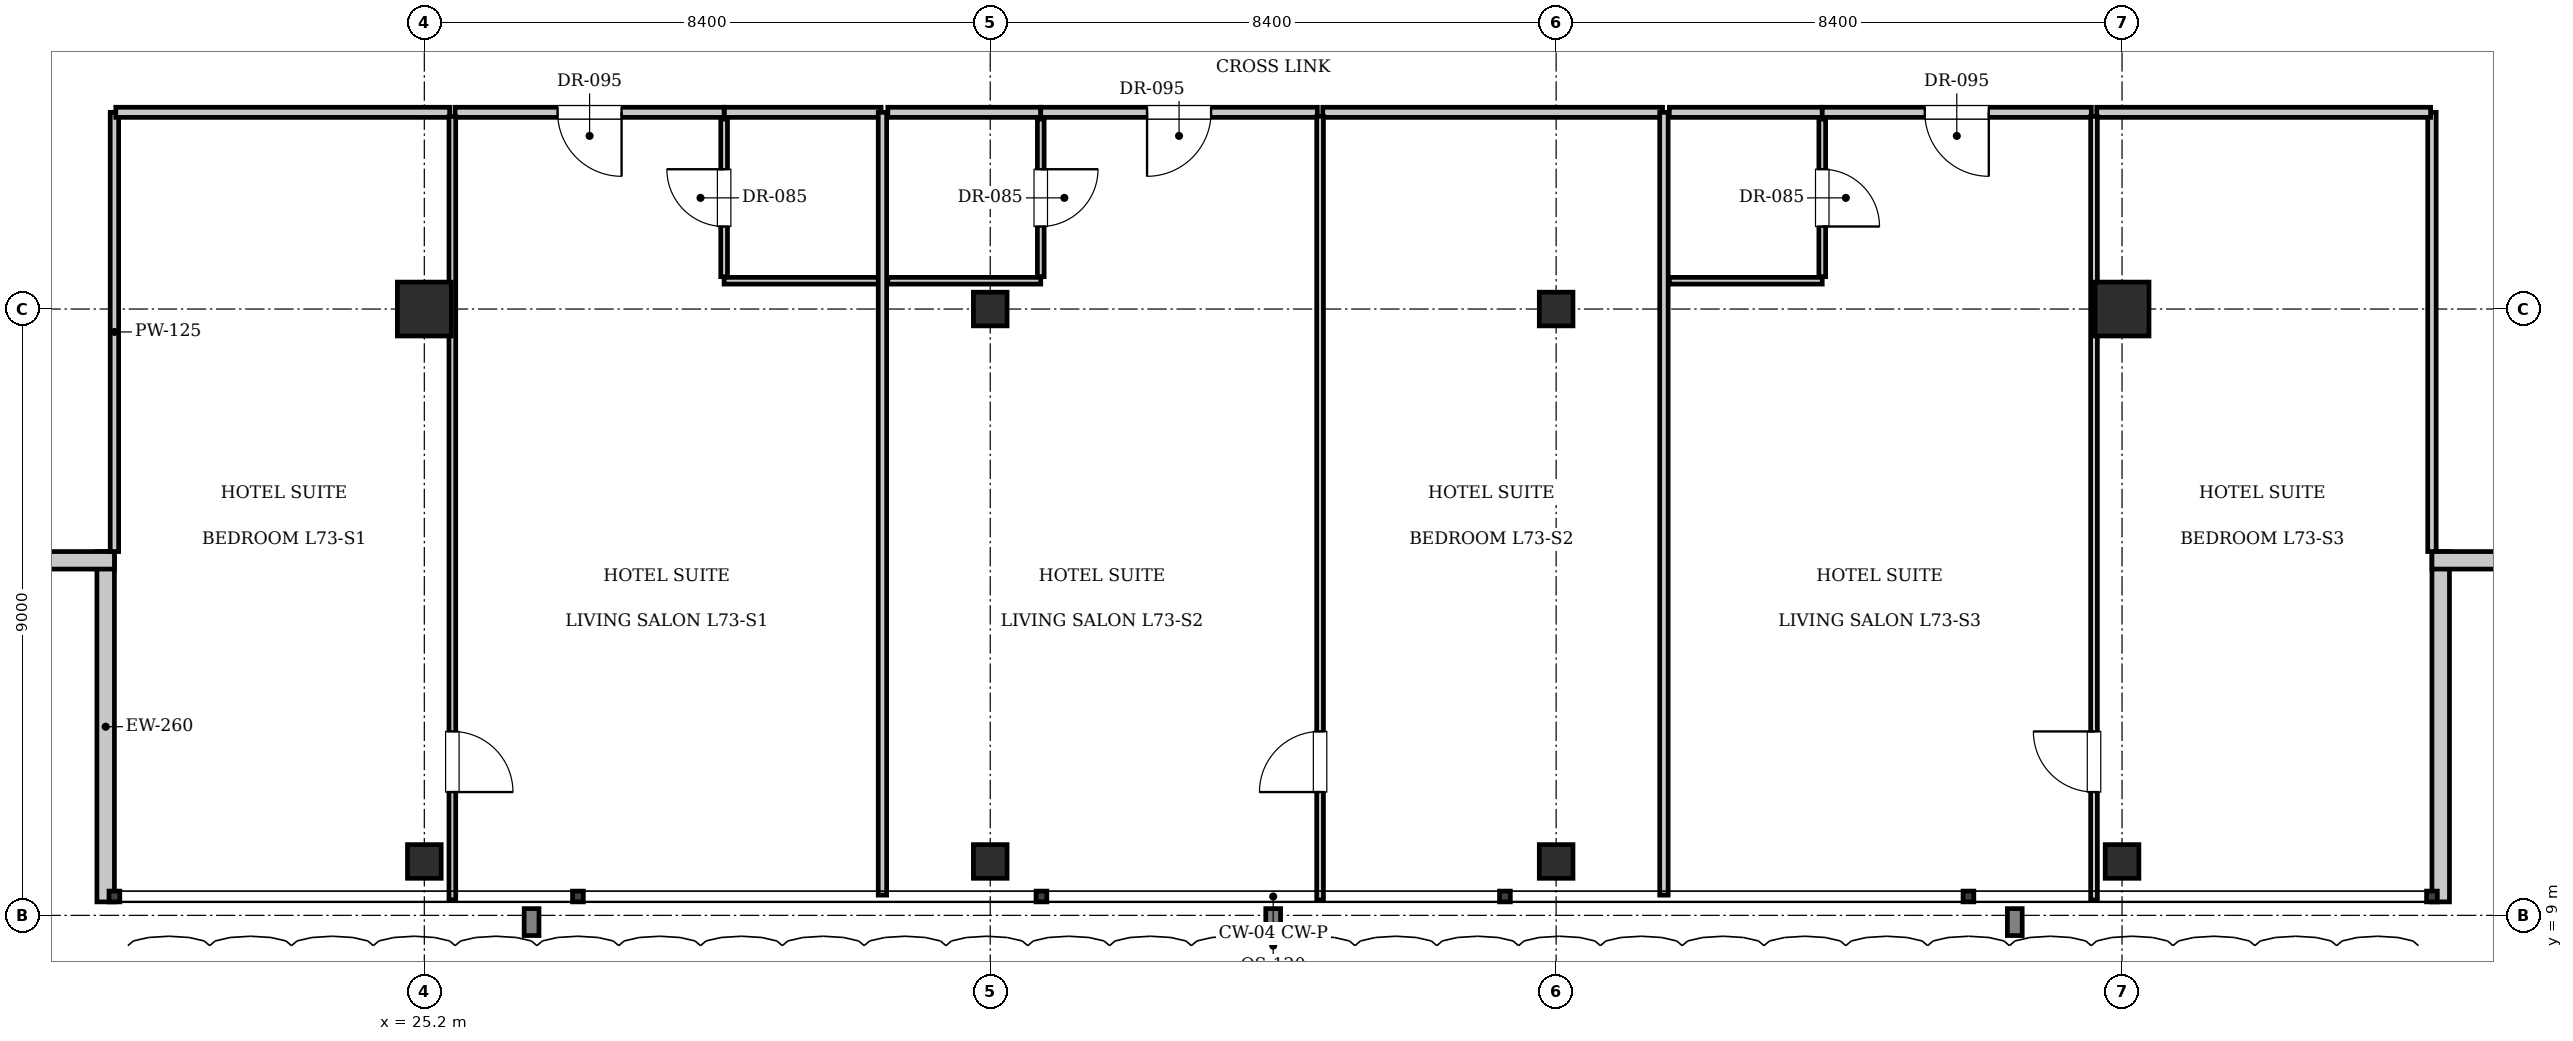
"""IFC4 building model, lengths in metres.
Left out: names, types, materials, properties, quantities, classifications, styles, units other than length and angle.
Written with IfcOpenShell. Run it as: python <this file> out.ifc"""

import sys

from ifc_helpers import new_model, si_unit, direction, frame, frame_2d, origin, origin_2d, place, context, subcontext, project, spatial, rectangle, i_section, extrude, element, fill, save


model = new_model("IFC4")
c1 = context("Model", 3, precision=1e-05, world=origin(), true_north=direction((0.0, 1.0)))
c2 = subcontext(c1, "Body", "Model", "MODEL_VIEW")
j1 = project(units=[si_unit("LENGTHUNIT", "METRE"), si_unit("PLANEANGLEUNIT", "RADIAN")], contexts=[c1])
p1 = place(None, origin())
s1 = spatial("IfcSite", under=j1, at=p1, CompositionType="ELEMENT")
p2 = place(p1, origin())
s2 = spatial("IfcBuilding", under=s1, at=p2, CompositionType="ELEMENT")
p3 = place(p2, frame((0.0, 0.0, 297.15)))
s3 = spatial("IfcBuildingStorey", under=s2, at=p3, CompositionType="ELEMENT", Elevation=297.15)
for number, where, z_axis, x_axis in (
    (1, (25.2, 18.0, 0.0), (0.0, 0.0, 1.0), (1.0, 0.0, 0.0)),
    (2, (50.4, 18.0, 0.0), (0.0, 0.0, 1.0), (1.0, 0.0, 0.0)),
):
    element("IfcColumn", number, at=place(p3, frame(where, z_axis=z_axis, x_axis=x_axis)), inside=s3, PredefinedType="COLUMN", context=c2, shape_type="SweptSolid", body=[
        extrude(rectangle(XDim=0.8, YDim=0.8, at=origin_2d()), origin(), (0.0, 0.0, 1.0), 3.85),
    ])
for number, where, z_axis, x_axis in (
    (3, (33.6, 18.0, 0.0), (0.0, 0.0, 1.0), (1.0, 0.0, 0.0)),
    (4, (42.0, 18.0, 0.0), (0.0, 0.0, 1.0), (1.0, 0.0, 0.0)),
    (5, (25.2, 9.8, 0.0), (0.0, 0.0, 1.0), (1.0, 0.0, 0.0)),
    (6, (33.6, 9.8, 0.0), (0.0, 0.0, 1.0), (1.0, 0.0, 0.0)),
    (7, (42.0, 9.8, 0.0), (0.0, 0.0, 1.0), (1.0, 0.0, 0.0)),
    (8, (50.4, 9.8, 0.0), (0.0, 0.0, 1.0), (1.0, 0.0, 0.0)),
):
    element("IfcColumn", number, at=place(p3, frame(where, z_axis=z_axis, x_axis=x_axis)), inside=s3, PredefinedType="COLUMN", context=c2, shape_type="SweptSolid", body=[
        extrude(i_section(OverallWidth=0.5, OverallDepth=0.5, WebThickness=0.022, FlangeThickness=0.032, at=origin_2d()), origin(), (0.0, 0.0, 1.0), 3.85),
    ])
p4 = place(p3, frame((20.47, 9.2, 0.0), z_axis=(0.0, 0.0, 1.0), x_axis=(0.0, 1.0, 0.0)))
e9 = element("IfcWall", 9, at=p4, inside=s3, PredefinedType="SOLIDWALL", context=c2, shape_type="SweptSolid", body=[
    extrude(rectangle(XDim=5.2, YDim=0.26, at=frame_2d((2.6, 0.0))), origin(), (0.0, 0.0, 1.0), 3.61),
])
p5 = place(p3, frame((20.6, 14.27, 0.0), z_axis=(0.0, 0.0, 1.0), x_axis=(-1.0, 0.0, 0.0)))
e10 = element("IfcWall", 10, at=p5, inside=s3, PredefinedType="SOLIDWALL", context=c2, shape_type="SweptSolid", body=[
    extrude(rectangle(XDim=5.2, YDim=0.26, at=frame_2d((2.6, 0.0))), origin(), (0.0, 0.0, 1.0), 3.61),
])
p6 = place(p5, frame((1.6, 0.0, 0.9)))
e11 = element("IfcOpeningElement", 11, at=p6, cuts=e10, PredefinedType="OPENING", context=c2, shape_type="SweptSolid", body=[
    extrude(rectangle(XDim=2.0, YDim=2.2, at=frame_2d((1.0, 1.1))), frame((0.0, 0.14, 0.0), z_axis=(0.0, -1.0, 0.0), x_axis=(1.0, 0.0, 0.0)), (0.0, 0.0, 1.0), 0.28),
])
p7 = place(p3, frame((55.13, 14.4, 0.0), z_axis=(0.0, 0.0, 1.0), x_axis=(0.0, -1.0, 0.0)))
e12 = element("IfcWall", 12, at=p7, inside=s3, PredefinedType="SOLIDWALL", context=c2, shape_type="SweptSolid", body=[
    extrude(rectangle(XDim=5.2, YDim=0.26, at=frame_2d((2.6, 0.0))), origin(), (0.0, 0.0, 1.0), 3.61),
])
p8 = place(p3, frame((60.2, 14.27, 0.0), z_axis=(0.0, 0.0, 1.0), x_axis=(-1.0, 0.0, 0.0)))
e13 = element("IfcWall", 13, at=p8, inside=s3, PredefinedType="SOLIDWALL", context=c2, shape_type="SweptSolid", body=[
    extrude(rectangle(XDim=5.2, YDim=0.26, at=frame_2d((2.6, 0.0))), origin(), (0.0, 0.0, 1.0), 3.61),
])
p9 = place(p8, frame((1.6, 0.0, 0.9)))
e14 = element("IfcOpeningElement", 14, at=p9, cuts=e13, PredefinedType="OPENING", context=c2, shape_type="SweptSolid", body=[
    extrude(rectangle(XDim=2.0, YDim=2.2, at=frame_2d((1.0, 1.1))), frame((0.0, 0.14, 0.0), z_axis=(0.0, -1.0, 0.0), x_axis=(1.0, 0.0, 0.0)), (0.0, 0.0, 1.0), 0.28),
])
for number, where, z_axis, x_axis in (
    (15, (20.6, 14.4, 0.0), (0.0, 0.0, 1.0), (0.0, 1.0, 0.0)),
    (16, (55.0, 14.4, 0.0), (0.0, 0.0, 1.0), (0.0, 1.0, 0.0)),
):
    element("IfcWall", number, at=place(p3, frame(where, z_axis=z_axis, x_axis=x_axis)), inside=s3, PredefinedType="PARTITIONING", context=c2, shape_type="SweptSolid", body=[
        extrude(rectangle(XDim=6.52, YDim=0.125, at=frame_2d((3.26, 0.0))), origin(), (0.0, 0.0, 1.0), 3.61),
    ])
p10 = place(p3, frame((29.65, 20.92, 0.0), z_axis=(0.0, 0.0, 1.0), x_axis=(1.0, 0.0, 0.0)))
e17 = element("IfcWall", 17, at=p10, inside=s3, PredefinedType="PARTITIONING", context=c2, shape_type="SweptSolid", body=[
    extrude(rectangle(XDim=2.33, YDim=0.15, at=frame_2d((1.165, 0.0))), origin(), (0.0, 0.0, 1.0), 3.61),
])
p11 = place(p3, frame((29.65, 18.42, 0.0), z_axis=(0.0, 0.0, 1.0), x_axis=(1.0, 0.0, 0.0)))
e18 = element("IfcWall", 18, at=p11, inside=s3, PredefinedType="PARTITIONING", context=c2, shape_type="SweptSolid", body=[
    extrude(rectangle(XDim=2.31, YDim=0.1, at=frame_2d((1.155, 0.0))), origin(), (0.0, 0.0, 1.0), 3.61),
])
p12 = place(p3, frame((29.65, 18.48, 0.0), z_axis=(0.0, 0.0, 1.0), x_axis=(0.0, 1.0, 0.0)))
e19 = element("IfcWall", 19, at=p12, inside=s3, PredefinedType="PARTITIONING", context=c2, shape_type="SweptSolid", body=[
    extrude(rectangle(XDim=2.34, YDim=0.1, at=frame_2d((1.17, 0.0))), origin(), (0.0, 0.0, 1.0), 3.61),
])
p13 = place(p12, frame((0.745, 0.0, 0.0)))
e20 = element("IfcOpeningElement", 20, at=p13, cuts=e19, PredefinedType="OPENING", context=c2, shape_type="SweptSolid", body=[
    extrude(rectangle(XDim=0.85, YDim=2.1, at=frame_2d((0.425, 1.05))), frame((0.0, 0.06, 0.0), z_axis=(0.0, -1.0, 0.0), x_axis=(1.0, 0.0, 0.0)), (0.0, 0.0, 1.0), 0.12),
])
p14 = place(p3, frame((20.62, 20.92, 0.0), z_axis=(0.0, 0.0, 1.0), x_axis=(1.0, 0.0, 0.0)))
e21 = element("IfcWall", 21, at=p14, inside=s3, PredefinedType="PARTITIONING", context=c2, shape_type="SweptSolid", body=[
    extrude(rectangle(XDim=4.956, YDim=0.15, at=frame_2d((2.478, 0.0))), origin(), (0.0, 0.0, 1.0), 3.61),
])
p15 = place(p3, frame((25.656, 20.92, 0.0), z_axis=(0.0, 0.0, 1.0), x_axis=(1.0, 0.0, 0.0)))
e22 = element("IfcWall", 22, at=p15, inside=s3, PredefinedType="PARTITIONING", context=c2, shape_type="SweptSolid", body=[
    extrude(rectangle(XDim=3.994, YDim=0.15, at=frame_2d((1.997, 0.0))), origin(), (0.0, 0.0, 1.0), 3.61),
])
p16 = place(p15, frame((1.522, 0.0, 0.0)))
e23 = element("IfcOpeningElement", 23, at=p16, cuts=e22, PredefinedType="OPENING", context=c2, shape_type="SweptSolid", body=[
    extrude(rectangle(XDim=0.95, YDim=2.15, at=frame_2d((0.475, 1.075))), frame((0.0, 0.085, 0.0), z_axis=(0.0, -1.0, 0.0), x_axis=(1.0, 0.0, 0.0)), (0.0, 0.0, 1.0), 0.17),
])
p17 = place(p3, frame((25.616, 9.23, 0.0), z_axis=(0.0, 0.0, 1.0), x_axis=(0.0, 1.0, 0.0)))
e24 = element("IfcWall", 24, at=p17, inside=s3, PredefinedType="PARTITIONING", context=c2, shape_type="SweptSolid", body=[
    extrude(rectangle(XDim=11.63, YDim=0.1, at=frame_2d((5.815, 0.0))), origin(), (0.0, 0.0, 1.0), 3.61),
])
p18 = place(p17, frame((1.6, 0.0, 0.0)))
e25 = element("IfcOpeningElement", 25, at=p18, cuts=e24, PredefinedType="OPENING", context=c2, shape_type="SweptSolid", body=[
    extrude(rectangle(XDim=0.9, YDim=2.1, at=frame_2d((0.45, 1.05))), frame((0.0, 0.06, 0.0), z_axis=(0.0, -1.0, 0.0), x_axis=(1.0, 0.0, 0.0)), (0.0, 0.0, 1.0), 0.12),
])
p19 = place(p3, frame((32.0, 9.3, 0.0), z_axis=(0.0, 0.0, 1.0), x_axis=(0.0, 1.0, 0.0)))
e26 = element("IfcWall", 26, at=p19, inside=s3, PredefinedType="PARTITIONING", context=c2, shape_type="SweptSolid", body=[
    extrude(rectangle(XDim=11.62, YDim=0.125, at=frame_2d((5.81, 0.0))), origin(), (0.0, 0.0, 1.0), 3.61),
])
p20 = place(p3, frame((32.08, 20.92, 0.0), z_axis=(0.0, 0.0, 1.0), x_axis=(1.0, 0.0, 0.0)))
e27 = element("IfcWall", 27, at=p20, inside=s3, PredefinedType="PARTITIONING", context=c2, shape_type="SweptSolid", body=[
    extrude(rectangle(XDim=2.27, YDim=0.15, at=frame_2d((1.135, 0.0))), origin(), (0.0, 0.0, 1.0), 3.61),
])
p21 = place(p3, frame((32.08, 18.42, 0.0), z_axis=(0.0, 0.0, 1.0), x_axis=(1.0, 0.0, 0.0)))
e28 = element("IfcWall", 28, at=p21, inside=s3, PredefinedType="PARTITIONING", context=c2, shape_type="SweptSolid", body=[
    extrude(rectangle(XDim=2.27, YDim=0.1, at=frame_2d((1.135, 0.0))), origin(), (0.0, 0.0, 1.0), 3.61),
])
p22 = place(p3, frame((34.35, 18.48, 0.0), z_axis=(0.0, 0.0, 1.0), x_axis=(0.0, 1.0, 0.0)))
e29 = element("IfcWall", 29, at=p22, inside=s3, PredefinedType="PARTITIONING", context=c2, shape_type="SweptSolid", body=[
    extrude(rectangle(XDim=2.34, YDim=0.1, at=frame_2d((1.17, 0.0))), origin(), (0.0, 0.0, 1.0), 3.61),
])
p23 = place(p22, frame((0.745, 0.0, 0.0)))
e30 = element("IfcOpeningElement", 30, at=p23, cuts=e29, PredefinedType="OPENING", context=c2, shape_type="SweptSolid", body=[
    extrude(rectangle(XDim=0.85, YDim=2.1, at=frame_2d((0.425, 1.05))), frame((0.0, 0.06, 0.0), z_axis=(0.0, -1.0, 0.0), x_axis=(1.0, 0.0, 0.0)), (0.0, 0.0, 1.0), 0.12),
])
p24 = place(p3, frame((34.35, 20.92, 0.0), z_axis=(0.0, 0.0, 1.0), x_axis=(1.0, 0.0, 0.0)))
e31 = element("IfcWall", 31, at=p24, inside=s3, PredefinedType="PARTITIONING", context=c2, shape_type="SweptSolid", body=[
    extrude(rectangle(XDim=4.106, YDim=0.15, at=frame_2d((2.053, 0.0))), origin(), (0.0, 0.0, 1.0), 3.61),
])
p25 = place(p24, frame((1.578, 0.0, 0.0)))
e32 = element("IfcOpeningElement", 32, at=p25, cuts=e31, PredefinedType="OPENING", context=c2, shape_type="SweptSolid", body=[
    extrude(rectangle(XDim=0.95, YDim=2.15, at=frame_2d((0.475, 1.075))), frame((0.0, 0.085, 0.0), z_axis=(0.0, -1.0, 0.0), x_axis=(1.0, 0.0, 0.0)), (0.0, 0.0, 1.0), 0.17),
])
p26 = place(p3, frame((38.536, 20.92, 0.0), z_axis=(0.0, 0.0, 1.0), x_axis=(1.0, 0.0, 0.0)))
e33 = element("IfcWall", 33, at=p26, inside=s3, PredefinedType="PARTITIONING", context=c2, shape_type="SweptSolid", body=[
    extrude(rectangle(XDim=5.044, YDim=0.15, at=frame_2d((2.522, 0.0))), origin(), (0.0, 0.0, 1.0), 3.61),
])
p27 = place(p3, frame((38.496, 9.23, 0.0), z_axis=(0.0, 0.0, 1.0), x_axis=(0.0, 1.0, 0.0)))
e34 = element("IfcWall", 34, at=p27, inside=s3, PredefinedType="PARTITIONING", context=c2, shape_type="SweptSolid", body=[
    extrude(rectangle(XDim=11.63, YDim=0.1, at=frame_2d((5.815, 0.0))), origin(), (0.0, 0.0, 1.0), 3.61),
])
p28 = place(p27, frame((1.6, 0.0, 0.0)))
e35 = element("IfcOpeningElement", 35, at=p28, cuts=e34, PredefinedType="OPENING", context=c2, shape_type="SweptSolid", body=[
    extrude(rectangle(XDim=0.9, YDim=2.1, at=frame_2d((0.45, 1.05))), frame((0.0, 0.06, 0.0), z_axis=(0.0, -1.0, 0.0), x_axis=(1.0, 0.0, 0.0)), (0.0, 0.0, 1.0), 0.12),
])
p29 = place(p3, frame((43.6, 9.3, 0.0), z_axis=(0.0, 0.0, 1.0), x_axis=(0.0, 1.0, 0.0)))
e36 = element("IfcWall", 36, at=p29, inside=s3, PredefinedType="PARTITIONING", context=c2, shape_type="SweptSolid", body=[
    extrude(rectangle(XDim=11.62, YDim=0.125, at=frame_2d((5.81, 0.0))), origin(), (0.0, 0.0, 1.0), 3.61),
])
p30 = place(p3, frame((43.68, 20.92, 0.0), z_axis=(0.0, 0.0, 1.0), x_axis=(1.0, 0.0, 0.0)))
e37 = element("IfcWall", 37, at=p30, inside=s3, PredefinedType="PARTITIONING", context=c2, shape_type="SweptSolid", body=[
    extrude(rectangle(XDim=2.27, YDim=0.15, at=frame_2d((1.135, 0.0))), origin(), (0.0, 0.0, 1.0), 3.61),
])
p31 = place(p3, frame((43.68, 18.42, 0.0), z_axis=(0.0, 0.0, 1.0), x_axis=(1.0, 0.0, 0.0)))
e38 = element("IfcWall", 38, at=p31, inside=s3, PredefinedType="PARTITIONING", context=c2, shape_type="SweptSolid", body=[
    extrude(rectangle(XDim=2.27, YDim=0.1, at=frame_2d((1.135, 0.0))), origin(), (0.0, 0.0, 1.0), 3.61),
])
p32 = place(p3, frame((45.95, 18.48, 0.0), z_axis=(0.0, 0.0, 1.0), x_axis=(0.0, 1.0, 0.0)))
e39 = element("IfcWall", 39, at=p32, inside=s3, PredefinedType="PARTITIONING", context=c2, shape_type="SweptSolid", body=[
    extrude(rectangle(XDim=2.34, YDim=0.1, at=frame_2d((1.17, 0.0))), origin(), (0.0, 0.0, 1.0), 3.61),
])
p33 = place(p32, frame((0.745, 0.0, 0.0)))
e40 = element("IfcOpeningElement", 40, at=p33, cuts=e39, PredefinedType="OPENING", context=c2, shape_type="SweptSolid", body=[
    extrude(rectangle(XDim=0.85, YDim=2.1, at=frame_2d((0.425, 1.05))), frame((0.0, 0.06, 0.0), z_axis=(0.0, -1.0, 0.0), x_axis=(1.0, 0.0, 0.0)), (0.0, 0.0, 1.0), 0.12),
])
p34 = place(p3, frame((45.95, 20.92, 0.0), z_axis=(0.0, 0.0, 1.0), x_axis=(1.0, 0.0, 0.0)))
e41 = element("IfcWall", 41, at=p34, inside=s3, PredefinedType="PARTITIONING", context=c2, shape_type="SweptSolid", body=[
    extrude(rectangle(XDim=3.994, YDim=0.15, at=frame_2d((1.997, 0.0))), origin(), (0.0, 0.0, 1.0), 3.61),
])
p35 = place(p34, frame((1.522, 0.0, 0.0)))
e42 = element("IfcOpeningElement", 42, at=p35, cuts=e41, PredefinedType="OPENING", context=c2, shape_type="SweptSolid", body=[
    extrude(rectangle(XDim=0.95, YDim=2.15, at=frame_2d((0.475, 1.075))), frame((0.0, 0.085, 0.0), z_axis=(0.0, -1.0, 0.0), x_axis=(1.0, 0.0, 0.0)), (0.0, 0.0, 1.0), 0.17),
])
p36 = place(p3, frame((50.024, 20.92, 0.0), z_axis=(0.0, 0.0, 1.0), x_axis=(1.0, 0.0, 0.0)))
e43 = element("IfcWall", 43, at=p36, inside=s3, PredefinedType="PARTITIONING", context=c2, shape_type="SweptSolid", body=[
    extrude(rectangle(XDim=4.956, YDim=0.15, at=frame_2d((2.478, 0.0))), origin(), (0.0, 0.0, 1.0), 3.61),
])
p37 = place(p3, frame((49.984, 9.23, 0.0), z_axis=(0.0, 0.0, 1.0), x_axis=(0.0, 1.0, 0.0)))
e44 = element("IfcWall", 44, at=p37, inside=s3, PredefinedType="PARTITIONING", context=c2, shape_type="SweptSolid", body=[
    extrude(rectangle(XDim=11.63, YDim=0.1, at=frame_2d((5.815, 0.0))), origin(), (0.0, 0.0, 1.0), 3.61),
])
p38 = place(p37, frame((1.6, 0.0, 0.0)))
e45 = element("IfcOpeningElement", 45, at=p38, cuts=e44, PredefinedType="OPENING", context=c2, shape_type="SweptSolid", body=[
    extrude(rectangle(XDim=0.9, YDim=2.1, at=frame_2d((0.45, 1.05))), frame((0.0, 0.06, 0.0), z_axis=(0.0, -1.0, 0.0), x_axis=(1.0, 0.0, 0.0)), (0.0, 0.0, 1.0), 0.12),
])
p39 = place(p13, origin())
e46 = element("IfcDoor", 46, at=p39, inside=s3, OperationType="SINGLE_SWING_RIGHT", PredefinedType="DOOR", context=c2, shape_type="SweptSolid", body=[
    extrude(rectangle(XDim=0.85, YDim=2.1, at=frame_2d((0.425, 1.05))), frame((0.0, 0.025, 0.0), z_axis=(0.0, -1.0, 0.0), x_axis=(1.0, 0.0, 0.0)), (0.0, 0.0, 1.0), 0.05),
])
fill(e20, e46)
p40 = place(p16, frame((0.95, 0.0, 0.0), z_axis=(0.0, 0.0, 1.0), x_axis=(-1.0, 0.0, 0.0)))
e47 = element("IfcDoor", 47, at=p40, inside=s3, OperationType="SINGLE_SWING_LEFT", PredefinedType="DOOR", context=c2, shape_type="SweptSolid", body=[
    extrude(rectangle(XDim=0.95, YDim=2.15, at=frame_2d((0.475, 1.075))), frame((0.0, 0.025, 0.0), z_axis=(0.0, -1.0, 0.0), x_axis=(1.0, 0.0, 0.0)), (0.0, 0.0, 1.0), 0.05),
])
fill(e23, e47)
p41 = place(p18, frame((0.9, 0.0, 0.0), z_axis=(0.0, 0.0, 1.0), x_axis=(-1.0, 0.0, 0.0)))
e48 = element("IfcDoor", 48, at=p41, inside=s3, OperationType="SINGLE_SWING_RIGHT", PredefinedType="DOOR", context=c2, shape_type="SweptSolid", body=[
    extrude(rectangle(XDim=0.9, YDim=2.1, at=frame_2d((0.45, 1.05))), frame((0.0, 0.025, 0.0), z_axis=(0.0, -1.0, 0.0), x_axis=(1.0, 0.0, 0.0)), (0.0, 0.0, 1.0), 0.05),
])
fill(e25, e48)
p42 = place(p23, frame((0.85, 0.0, 0.0), z_axis=(0.0, 0.0, 1.0), x_axis=(-1.0, 0.0, 0.0)))
e49 = element("IfcDoor", 49, at=p42, inside=s3, OperationType="SINGLE_SWING_LEFT", PredefinedType="DOOR", context=c2, shape_type="SweptSolid", body=[
    extrude(rectangle(XDim=0.85, YDim=2.1, at=frame_2d((0.425, 1.05))), frame((0.0, 0.025, 0.0), z_axis=(0.0, -1.0, 0.0), x_axis=(1.0, 0.0, 0.0)), (0.0, 0.0, 1.0), 0.05),
])
fill(e30, e49)
p43 = place(p25, frame((0.95, 0.0, 0.0), z_axis=(0.0, 0.0, 1.0), x_axis=(-1.0, 0.0, 0.0)))
e50 = element("IfcDoor", 50, at=p43, inside=s3, OperationType="SINGLE_SWING_RIGHT", PredefinedType="DOOR", context=c2, shape_type="SweptSolid", body=[
    extrude(rectangle(XDim=0.95, YDim=2.15, at=frame_2d((0.475, 1.075))), frame((0.0, 0.025, 0.0), z_axis=(0.0, -1.0, 0.0), x_axis=(1.0, 0.0, 0.0)), (0.0, 0.0, 1.0), 0.05),
])
fill(e32, e50)
p44 = place(p28, origin())
e51 = element("IfcDoor", 51, at=p44, inside=s3, OperationType="SINGLE_SWING_LEFT", PredefinedType="DOOR", context=c2, shape_type="SweptSolid", body=[
    extrude(rectangle(XDim=0.9, YDim=2.1, at=frame_2d((0.45, 1.05))), frame((0.0, 0.025, 0.0), z_axis=(0.0, -1.0, 0.0), x_axis=(1.0, 0.0, 0.0)), (0.0, 0.0, 1.0), 0.05),
])
fill(e35, e51)
p45 = place(p33, frame((0.85, 0.0, 0.0), z_axis=(0.0, 0.0, 1.0), x_axis=(-1.0, 0.0, 0.0)))
e52 = element("IfcDoor", 52, at=p45, inside=s3, OperationType="SINGLE_SWING_RIGHT", PredefinedType="DOOR", context=c2, shape_type="SweptSolid", body=[
    extrude(rectangle(XDim=0.85, YDim=2.1, at=frame_2d((0.425, 1.05))), frame((0.0, 0.025, 0.0), z_axis=(0.0, -1.0, 0.0), x_axis=(1.0, 0.0, 0.0)), (0.0, 0.0, 1.0), 0.05),
])
fill(e40, e52)
p46 = place(p35, frame((0.95, 0.0, 0.0), z_axis=(0.0, 0.0, 1.0), x_axis=(-1.0, 0.0, 0.0)))
e53 = element("IfcDoor", 53, at=p46, inside=s3, OperationType="SINGLE_SWING_LEFT", PredefinedType="DOOR", context=c2, shape_type="SweptSolid", body=[
    extrude(rectangle(XDim=0.95, YDim=2.15, at=frame_2d((0.475, 1.075))), frame((0.0, 0.025, 0.0), z_axis=(0.0, -1.0, 0.0), x_axis=(1.0, 0.0, 0.0)), (0.0, 0.0, 1.0), 0.05),
])
fill(e42, e53)
p47 = place(p38, origin())
e54 = element("IfcDoor", 54, at=p47, inside=s3, OperationType="SINGLE_SWING_RIGHT", PredefinedType="DOOR", context=c2, shape_type="SweptSolid", body=[
    extrude(rectangle(XDim=0.9, YDim=2.1, at=frame_2d((0.45, 1.05))), frame((0.0, 0.025, 0.0), z_axis=(0.0, -1.0, 0.0), x_axis=(1.0, 0.0, 0.0)), (0.0, 0.0, 1.0), 0.05),
])
fill(e45, e54)
save(model, sys.argv[1])
